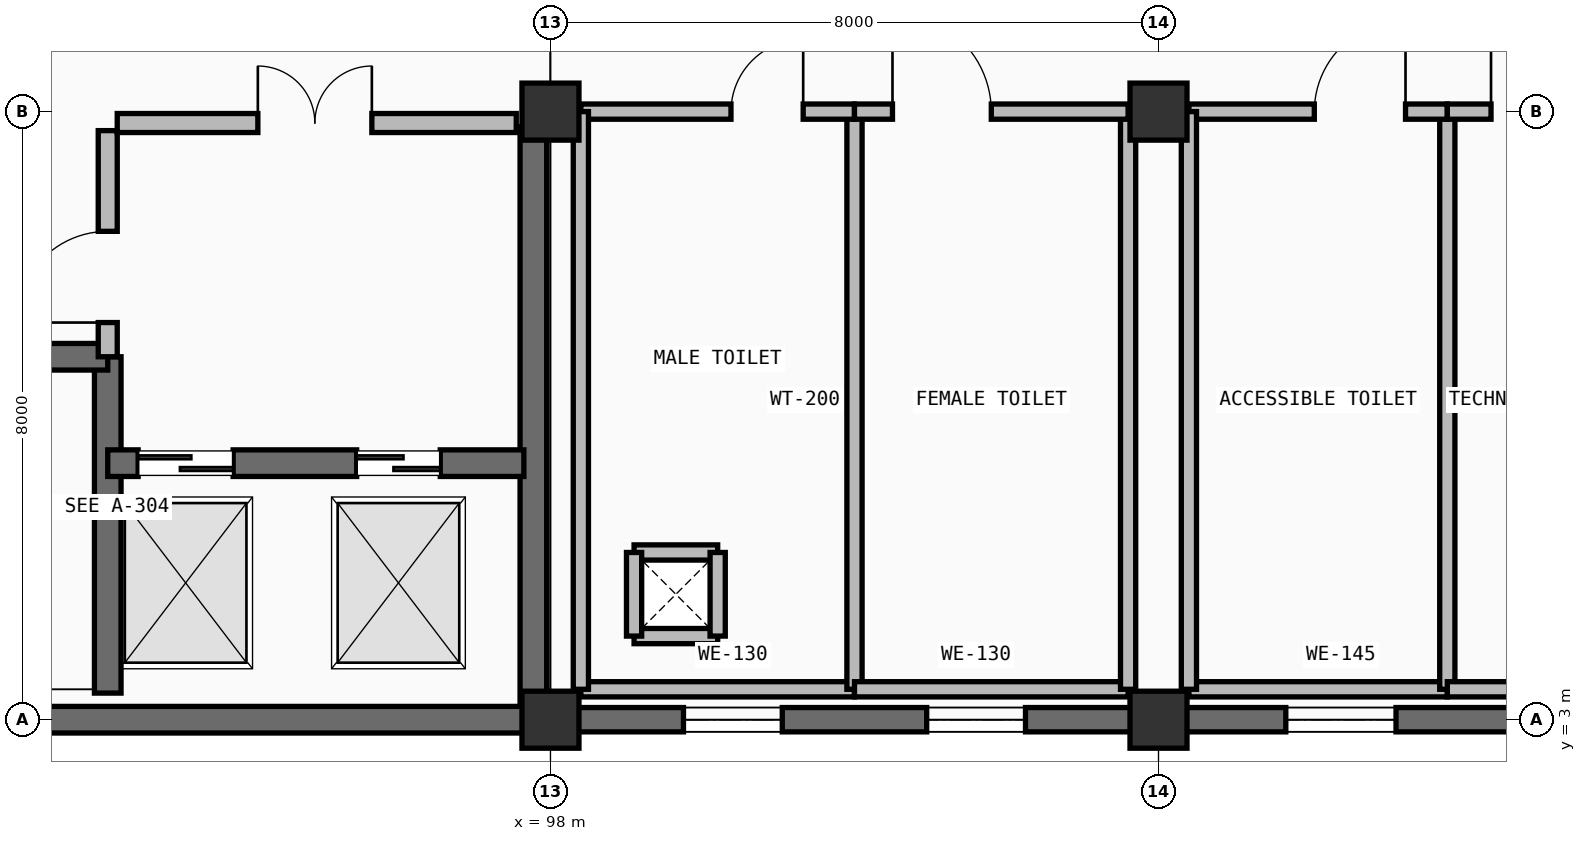
"""IFC4 building model, lengths in metres.
Left out: names, types, materials, properties, quantities, classifications, styles, units other than length and angle.
Written with IfcOpenShell. Run it as: python <this file> out.ifc"""

import sys

from ifc_helpers import new_model, si_unit, direction, frame, frame_2d, origin, origin_2d, place, context, subcontext, project, spatial, rectangle, extrude, element, fill, save


model = new_model("IFC4")
c1 = context("Model", 3, precision=1e-05, world=origin(), true_north=direction((0.0, 1.0)))
c2 = subcontext(c1, "Body", "Model", "MODEL_VIEW")
j1 = project(units=[si_unit("LENGTHUNIT", "METRE"), si_unit("PLANEANGLEUNIT", "RADIAN")], contexts=[c1])
p1 = place(None, origin())
s1 = spatial("IfcSite", under=j1, at=p1, CompositionType="ELEMENT")
p2 = place(p1, origin())
s2 = spatial("IfcBuilding", under=s1, at=p2, CompositionType="ELEMENT")
p3 = place(p2, frame((0.0, 0.0, 5.4)))
s3 = spatial("IfcBuildingStorey", under=s2, at=p3, CompositionType="ELEMENT", Elevation=5.4)
for number, where, z_axis, x_axis in (
    (1, (98.0, 3.0, 0.0), (0.0, 0.0, 1.0), (1.0, 0.0, 0.0)),
    (2, (98.0, 11.0, 0.0), (0.0, 0.0, 1.0), (1.0, 0.0, 0.0)),
    (3, (106.0, 3.0, 0.0), (0.0, 0.0, 1.0), (1.0, 0.0, 0.0)),
    (4, (106.0, 11.0, 0.0), (0.0, 0.0, 1.0), (1.0, 0.0, 0.0)),
):
    element("IfcColumn", number, at=place(p3, frame(where, z_axis=z_axis, x_axis=x_axis)), inside=s3, PredefinedType="COLUMN", context=c2, shape_type="SweptSolid", body=[
        extrude(rectangle(XDim=0.75, YDim=0.75, at=origin_2d()), origin(), (0.0, 0.0, 1.0), 4.5),
    ])
p4 = place(p3, frame((114.0, 3.0, 0.0), z_axis=(0.0, 0.0, 1.0), x_axis=(-1.0, 0.0, 0.0)))
e5 = element("IfcWall", 5, at=p4, inside=s3, PredefinedType="SOLIDWALL", context=c2, shape_type="SweptSolid", body=[
    extrude(rectangle(XDim=8.0, YDim=0.32, at=frame_2d((4.0, 0.0))), origin(), (0.0, 0.0, 1.0), 4.5),
])
p5 = place(p4, frame((1.675, 0.0, 1.0)))
e6 = element("IfcOpeningElement", 6, at=p5, cuts=e5, PredefinedType="OPENING", context=c2, shape_type="SweptSolid", body=[
    extrude(rectangle(XDim=1.45, YDim=1.85, at=frame_2d((0.725, 0.925))), frame((0.0, 0.17, 0.0), z_axis=(0.0, -1.0, 0.0), x_axis=(1.0, 0.0, 0.0)), (0.0, 0.0, 1.0), 0.34),
])
p6 = place(p4, frame((4.875, 0.0, 1.0)))
e7 = element("IfcOpeningElement", 7, at=p6, cuts=e5, PredefinedType="OPENING", context=c2, shape_type="SweptSolid", body=[
    extrude(rectangle(XDim=1.45, YDim=1.85, at=frame_2d((0.725, 0.925))), frame((0.0, 0.17, 0.0), z_axis=(0.0, -1.0, 0.0), x_axis=(1.0, 0.0, 0.0)), (0.0, 0.0, 1.0), 0.34),
])
p7 = place(p3, frame((106.0, 3.0, 0.0), z_axis=(0.0, 0.0, 1.0), x_axis=(-1.0, 0.0, 0.0)))
e8 = element("IfcWall", 8, at=p7, inside=s3, PredefinedType="SOLIDWALL", context=c2, shape_type="SweptSolid", body=[
    extrude(rectangle(XDim=8.0, YDim=0.32, at=frame_2d((4.0, 0.0))), origin(), (0.0, 0.0, 1.0), 4.5),
])
p8 = place(p7, frame((1.75, 0.0, 1.0)))
e9 = element("IfcOpeningElement", 9, at=p8, cuts=e8, PredefinedType="OPENING", context=c2, shape_type="SweptSolid", body=[
    extrude(rectangle(XDim=1.3, YDim=1.7, at=frame_2d((0.65, 0.85))), frame((0.0, 0.17, 0.0), z_axis=(0.0, -1.0, 0.0), x_axis=(1.0, 0.0, 0.0)), (0.0, 0.0, 1.0), 0.34),
])
p9 = place(p7, frame((4.95, 0.0, 1.0)))
e10 = element("IfcOpeningElement", 10, at=p9, cuts=e8, PredefinedType="OPENING", context=c2, shape_type="SweptSolid", body=[
    extrude(rectangle(XDim=1.3, YDim=1.7, at=frame_2d((0.65, 0.85))), frame((0.0, 0.17, 0.0), z_axis=(0.0, -1.0, 0.0), x_axis=(1.0, 0.0, 0.0)), (0.0, 0.0, 1.0), 0.34),
])
p10 = place(p3, frame((98.0, 3.0, 0.0), z_axis=(0.0, 0.0, 1.0), x_axis=(-1.0, 0.0, 0.0)))
e11 = element("IfcWall", 11, at=p10, inside=s3, PredefinedType="SHEAR", context=c2, shape_type="SweptSolid", body=[
    extrude(rectangle(XDim=8.0, YDim=0.35, at=frame_2d((4.0, 0.0))), origin(), (0.0, 0.0, 1.0), 4.5),
])
p11 = place(p3, frame((92.175, 3.35, 0.0), z_axis=(0.0, 0.0, 1.0), x_axis=(0.0, 1.0, 0.0)))
e12 = element("IfcWall", 12, at=p11, inside=s3, PredefinedType="SHEAR", context=c2, shape_type="SweptSolid", body=[
    extrude(rectangle(XDim=4.425, YDim=0.35, at=frame_2d((2.212, 0.0))), origin(), (0.0, 0.0, 1.0), 4.2),
])
p12 = place(p3, frame((97.775, 3.2, 0.0), z_axis=(0.0, 0.0, 1.0), x_axis=(0.0, 1.0, 0.0)))
e13 = element("IfcWall", 13, at=p12, inside=s3, PredefinedType="SHEAR", context=c2, shape_type="SweptSolid", body=[
    extrude(rectangle(XDim=7.6, YDim=0.35, at=frame_2d((3.8, 0.0))), origin(), (0.0, 0.0, 1.0), 4.2),
])
p13 = place(p3, frame((82.35, 7.775, 0.0), z_axis=(0.0, 0.0, 1.0), x_axis=(1.0, 0.0, 0.0)))
e14 = element("IfcWall", 14, at=p13, inside=s3, PredefinedType="SHEAR", context=c2, shape_type="SweptSolid", body=[
    extrude(rectangle(XDim=9.825, YDim=0.35, at=frame_2d((4.913, 0.0))), origin(), (0.0, 0.0, 1.0), 4.2),
])
p14 = place(p13, frame((0.4, 0.0, 0.0)))
e15 = element("IfcOpeningElement", 15, at=p14, cuts=e14, PredefinedType="OPENING", context=c2, shape_type="SweptSolid", body=[
    extrude(rectangle(XDim=1.85, YDim=2.25, at=frame_2d((0.925, 1.125))), frame((0.0, 0.185, 0.0), z_axis=(0.0, -1.0, 0.0), x_axis=(1.0, 0.0, 0.0)), (0.0, 0.0, 1.0), 0.37),
])
p15 = place(p3, frame((92.175, 6.375, 0.0), z_axis=(0.0, 0.0, 1.0), x_axis=(1.0, 0.0, 0.0)))
e16 = element("IfcWall", 16, at=p15, inside=s3, PredefinedType="SHEAR", context=c2, shape_type="SweptSolid", body=[
    extrude(rectangle(XDim=5.475, YDim=0.35, at=frame_2d((2.737, 0.0))), origin(), (0.0, 0.0, 1.0), 4.2),
])
p16 = place(p15, frame((0.4, 0.0, 0.0)))
e17 = element("IfcOpeningElement", 17, at=p16, cuts=e16, PredefinedType="OPENING", context=c2, shape_type="SweptSolid", body=[
    extrude(rectangle(XDim=1.25, YDim=2.25, at=frame_2d((0.625, 1.125))), frame((0.0, 0.185, 0.0), z_axis=(0.0, -1.0, 0.0), x_axis=(1.0, 0.0, 0.0)), (0.0, 0.0, 1.0), 0.37),
])
p17 = place(p15, frame((3.275, 0.0, 0.0)))
e18 = element("IfcOpeningElement", 18, at=p17, cuts=e16, PredefinedType="OPENING", context=c2, shape_type="SweptSolid", body=[
    extrude(rectangle(XDim=1.1, YDim=2.2, at=frame_2d((0.55, 1.1))), frame((0.0, 0.185, 0.0), z_axis=(0.0, -1.0, 0.0), x_axis=(1.0, 0.0, 0.0)), (0.0, 0.0, 1.0), 0.37),
])
p18 = place(p3, frame((92.175, 7.775, 0.0), z_axis=(0.0, 0.0, 1.0), x_axis=(0.0, 1.0, 0.0)))
e19 = element("IfcWall", 19, at=p18, inside=s3, PredefinedType="PARTITIONING", context=c2, shape_type="SweptSolid", body=[
    extrude(rectangle(XDim=2.975, YDim=0.25, at=frame_2d((1.488, 0.0))), origin(), (0.0, 0.0, 1.0), 4.2),
])
p19 = place(p18, frame((0.45, 0.0, 0.0)))
e20 = element("IfcOpeningElement", 20, at=p19, cuts=e19, PredefinedType="OPENING", context=c2, shape_type="SweptSolid", body=[
    extrude(rectangle(XDim=1.2, YDim=2.2, at=frame_2d((0.6, 1.1))), frame((0.0, 0.135, 0.0), z_axis=(0.0, -1.0, 0.0), x_axis=(1.0, 0.0, 0.0)), (0.0, 0.0, 1.0), 0.27),
])
p20 = place(p3, frame((92.3, 10.85, 0.0), z_axis=(0.0, 0.0, 1.0), x_axis=(1.0, 0.0, 0.0)))
e21 = element("IfcWall", 21, at=p20, inside=s3, PredefinedType="PARTITIONING", context=c2, shape_type="SweptSolid", body=[
    extrude(rectangle(XDim=5.25, YDim=0.25, at=frame_2d((2.625, 0.0))), origin(), (0.0, 0.0, 1.0), 3.435),
])
p21 = place(p20, frame((1.85, 0.0, 0.0)))
e22 = element("IfcOpeningElement", 22, at=p21, cuts=e21, PredefinedType="OPENING", context=c2, shape_type="SweptSolid", body=[
    extrude(rectangle(XDim=1.5, YDim=2.2, at=frame_2d((0.75, 1.1))), frame((0.0, 0.135, 0.0), z_axis=(0.0, -1.0, 0.0), x_axis=(1.0, 0.0, 0.0)), (0.0, 0.0, 1.0), 0.27),
])
p22 = place(p3, frame((98.4, 3.4, 0.0), z_axis=(0.0, 0.0, 1.0), x_axis=(1.0, 0.0, 0.0)))
e23 = element("IfcWall", 23, at=p22, inside=s3, PredefinedType="PARTITIONING", context=c2, shape_type="SweptSolid", body=[
    extrude(rectangle(XDim=3.6, YDim=0.2, at=frame_2d((1.8, 0.0))), origin(), (0.0, 0.0, 1.0), 3.505),
])
p23 = place(p3, frame((102.0, 3.4, 0.0), z_axis=(0.0, 0.0, 1.0), x_axis=(0.0, 1.0, 0.0)))
e24 = element("IfcWall", 24, at=p23, inside=s3, PredefinedType="PARTITIONING", context=c2, shape_type="SweptSolid", body=[
    extrude(rectangle(XDim=7.6, YDim=0.2, at=frame_2d((3.8, 0.0))), origin(), (0.0, 0.0, 1.0), 3.635),
])
p24 = place(p3, frame((98.4, 11.0, 0.0), z_axis=(0.0, 0.0, 1.0), x_axis=(1.0, 0.0, 0.0)))
e25 = element("IfcWall", 25, at=p24, inside=s3, PredefinedType="PARTITIONING", context=c2, shape_type="SweptSolid", body=[
    extrude(rectangle(XDim=3.6, YDim=0.2, at=frame_2d((1.8, 0.0))), origin(), (0.0, 0.0, 1.0), 3.435),
])
p25 = place(p24, frame((1.975, 0.0, 0.0)))
e26 = element("IfcOpeningElement", 26, at=p25, cuts=e25, PredefinedType="OPENING", context=c2, shape_type="SweptSolid", body=[
    extrude(rectangle(XDim=0.95, YDim=2.1, at=frame_2d((0.475, 1.05))), frame((0.0, 0.11, 0.0), z_axis=(0.0, -1.0, 0.0), x_axis=(1.0, 0.0, 0.0)), (0.0, 0.0, 1.0), 0.22),
])
p26 = place(p3, frame((98.4, 3.4, 0.0), z_axis=(0.0, 0.0, 1.0), x_axis=(0.0, 1.0, 0.0)))
e27 = element("IfcWall", 27, at=p26, inside=s3, PredefinedType="PARTITIONING", context=c2, shape_type="SweptSolid", body=[
    extrude(rectangle(XDim=7.6, YDim=0.2, at=frame_2d((3.8, 0.0))), origin(), (0.0, 0.0, 1.0), 3.485),
])
p27 = place(p3, frame((102.0, 3.4, 0.0), z_axis=(0.0, 0.0, 1.0), x_axis=(1.0, 0.0, 0.0)))
e28 = element("IfcWall", 28, at=p27, inside=s3, PredefinedType="PARTITIONING", context=c2, shape_type="SweptSolid", body=[
    extrude(rectangle(XDim=3.6, YDim=0.2, at=frame_2d((1.8, 0.0))), origin(), (0.0, 0.0, 1.0), 3.505),
])
p28 = place(p3, frame((105.6, 3.4, 0.0), z_axis=(0.0, 0.0, 1.0), x_axis=(0.0, 1.0, 0.0)))
e29 = element("IfcWall", 29, at=p28, inside=s3, PredefinedType="PARTITIONING", context=c2, shape_type="SweptSolid", body=[
    extrude(rectangle(XDim=7.6, YDim=0.2, at=frame_2d((3.8, 0.0))), origin(), (0.0, 0.0, 1.0), 3.485),
])
p29 = place(p3, frame((102.0, 11.0, 0.0), z_axis=(0.0, 0.0, 1.0), x_axis=(1.0, 0.0, 0.0)))
e30 = element("IfcWall", 30, at=p29, inside=s3, PredefinedType="PARTITIONING", context=c2, shape_type="SweptSolid", body=[
    extrude(rectangle(XDim=3.6, YDim=0.2, at=frame_2d((1.8, 0.0))), origin(), (0.0, 0.0, 1.0), 3.435),
])
p30 = place(p29, frame((0.5, 0.0, 0.0)))
e31 = element("IfcOpeningElement", 31, at=p30, cuts=e30, PredefinedType="OPENING", context=c2, shape_type="SweptSolid", body=[
    extrude(rectangle(XDim=1.3, YDim=2.2, at=frame_2d((0.65, 1.1))), frame((0.0, 0.11, 0.0), z_axis=(0.0, -1.0, 0.0), x_axis=(1.0, 0.0, 0.0)), (0.0, 0.0, 1.0), 0.22),
])
p31 = place(p3, frame((106.4, 3.4, 0.0), z_axis=(0.0, 0.0, 1.0), x_axis=(1.0, 0.0, 0.0)))
e32 = element("IfcWall", 32, at=p31, inside=s3, PredefinedType="PARTITIONING", context=c2, shape_type="SweptSolid", body=[
    extrude(rectangle(XDim=3.4, YDim=0.2, at=frame_2d((1.7, 0.0))), origin(), (0.0, 0.0, 1.0), 3.505),
])
p32 = place(p3, frame((109.8, 3.4, 0.0), z_axis=(0.0, 0.0, 1.0), x_axis=(0.0, 1.0, 0.0)))
e33 = element("IfcWall", 33, at=p32, inside=s3, PredefinedType="PARTITIONING", context=c2, shape_type="SweptSolid", body=[
    extrude(rectangle(XDim=7.6, YDim=0.2, at=frame_2d((3.8, 0.0))), origin(), (0.0, 0.0, 1.0), 3.635),
])
p33 = place(p3, frame((106.4, 11.0, 0.0), z_axis=(0.0, 0.0, 1.0), x_axis=(1.0, 0.0, 0.0)))
e34 = element("IfcWall", 34, at=p33, inside=s3, PredefinedType="PARTITIONING", context=c2, shape_type="SweptSolid", body=[
    extrude(rectangle(XDim=3.4, YDim=0.2, at=frame_2d((1.7, 0.0))), origin(), (0.0, 0.0, 1.0), 3.435),
])
p34 = place(p33, frame((1.65, 0.0, 0.0)))
e35 = element("IfcOpeningElement", 35, at=p34, cuts=e34, PredefinedType="OPENING", context=c2, shape_type="SweptSolid", body=[
    extrude(rectangle(XDim=1.2, YDim=2.2, at=frame_2d((0.6, 1.1))), frame((0.0, 0.11, 0.0), z_axis=(0.0, -1.0, 0.0), x_axis=(1.0, 0.0, 0.0)), (0.0, 0.0, 1.0), 0.22),
])
p35 = place(p3, frame((106.4, 3.4, 0.0), z_axis=(0.0, 0.0, 1.0), x_axis=(0.0, 1.0, 0.0)))
e36 = element("IfcWall", 36, at=p35, inside=s3, PredefinedType="PARTITIONING", context=c2, shape_type="SweptSolid", body=[
    extrude(rectangle(XDim=7.6, YDim=0.2, at=frame_2d((3.8, 0.0))), origin(), (0.0, 0.0, 1.0), 3.485),
])
p36 = place(p3, frame((109.8, 3.4, 0.0), z_axis=(0.0, 0.0, 1.0), x_axis=(1.0, 0.0, 0.0)))
e37 = element("IfcWall", 37, at=p36, inside=s3, PredefinedType="PARTITIONING", context=c2, shape_type="SweptSolid", body=[
    extrude(rectangle(XDim=3.4, YDim=0.2, at=frame_2d((1.7, 0.0))), origin(), (0.0, 0.0, 1.0), 3.505),
])
p37 = place(p3, frame((109.8, 11.0, 0.0), z_axis=(0.0, 0.0, 1.0), x_axis=(1.0, 0.0, 0.0)))
e38 = element("IfcWall", 38, at=p37, inside=s3, PredefinedType="PARTITIONING", context=c2, shape_type="SweptSolid", body=[
    extrude(rectangle(XDim=3.4, YDim=0.2, at=frame_2d((1.7, 0.0))), origin(), (0.0, 0.0, 1.0), 3.435),
])
p38 = place(p37, frame((0.575, 0.0, 0.0)))
e39 = element("IfcOpeningElement", 39, at=p38, cuts=e38, PredefinedType="OPENING", context=c2, shape_type="SweptSolid", body=[
    extrude(rectangle(XDim=1.15, YDim=2.18, at=frame_2d((0.575, 1.09))), frame((0.0, 0.11, 0.0), z_axis=(0.0, -1.0, 0.0), x_axis=(1.0, 0.0, 0.0)), (0.0, 0.0, 1.0), 0.22),
])
for number, where, z_axis, x_axis in (
    (40, (99.1, 4.1, 0.0), (0.0, 0.0, 1.0), (1.0, 0.0, 0.0)),
    (41, (99.1, 5.2, 0.0), (0.0, 0.0, 1.0), (1.0, 0.0, 0.0)),
    (42, (99.1, 4.1, 0.0), (0.0, 0.0, 1.0), (0.0, 1.0, 0.0)),
    (43, (100.2, 4.1, 0.0), (0.0, 0.0, 1.0), (0.0, 1.0, 0.0)),
):
    element("IfcWall", number, at=place(p3, frame(where, z_axis=z_axis, x_axis=x_axis)), inside=s3, PredefinedType="PARTITIONING", context=c2, shape_type="SweptSolid", body=[
        extrude(rectangle(XDim=1.1, YDim=0.2, at=frame_2d((0.55, 0.0))), origin(), (0.0, 0.0, 1.0), 4.2),
    ])
p39 = place(p6, origin())
e44 = element("IfcWindow", 44, at=p39, inside=s3, PartitioningType="SINGLE_PANEL", PredefinedType="WINDOW", context=c2, shape_type="SweptSolid", body=[
    extrude(rectangle(XDim=1.45, YDim=1.85, at=frame_2d((0.725, 0.925))), frame((0.0, 0.03, 0.0), z_axis=(0.0, -1.0, 0.0), x_axis=(1.0, 0.0, 0.0)), (0.0, 0.0, 1.0), 0.06),
])
fill(e7, e44)
p40 = place(p8, origin())
e45 = element("IfcWindow", 45, at=p40, inside=s3, PartitioningType="SINGLE_PANEL", PredefinedType="WINDOW", context=c2, shape_type="SweptSolid", body=[
    extrude(rectangle(XDim=1.3, YDim=1.7, at=frame_2d((0.65, 0.85))), frame((0.0, 0.03, 0.0), z_axis=(0.0, -1.0, 0.0), x_axis=(1.0, 0.0, 0.0)), (0.0, 0.0, 1.0), 0.06),
])
fill(e9, e45)
p41 = place(p9, origin())
e46 = element("IfcWindow", 46, at=p41, inside=s3, PartitioningType="SINGLE_PANEL", PredefinedType="WINDOW", context=c2, shape_type="SweptSolid", body=[
    extrude(rectangle(XDim=1.3, YDim=1.7, at=frame_2d((0.65, 0.85))), frame((0.0, 0.03, 0.0), z_axis=(0.0, -1.0, 0.0), x_axis=(1.0, 0.0, 0.0)), (0.0, 0.0, 1.0), 0.06),
])
fill(e10, e46)
p42 = place(p16, origin())
e47 = element("IfcDoor", 47, at=p42, inside=s3, OperationType="DOUBLE_DOOR_SLIDING", PredefinedType="DOOR", context=c2, shape_type="SweptSolid", body=[
    extrude(rectangle(XDim=1.25, YDim=2.25, at=frame_2d((0.625, 1.125))), frame((0.0, 0.025, 0.0), z_axis=(0.0, -1.0, 0.0), x_axis=(1.0, 0.0, 0.0)), (0.0, 0.0, 1.0), 0.05),
])
fill(e17, e47)
p43 = place(p17, origin())
e48 = element("IfcDoor", 48, at=p43, inside=s3, OperationType="DOUBLE_DOOR_SLIDING", PredefinedType="DOOR", context=c2, shape_type="SweptSolid", body=[
    extrude(rectangle(XDim=1.1, YDim=2.2, at=frame_2d((0.55, 1.1))), frame((0.0, 0.025, 0.0), z_axis=(0.0, -1.0, 0.0), x_axis=(1.0, 0.0, 0.0)), (0.0, 0.0, 1.0), 0.05),
])
fill(e18, e48)
p44 = place(p19, origin())
e49 = element("IfcDoor", 49, at=p44, inside=s3, OperationType="SINGLE_SWING_LEFT", PredefinedType="DOOR", context=c2, shape_type="SweptSolid", body=[
    extrude(rectangle(XDim=1.2, YDim=2.2, at=frame_2d((0.6, 1.1))), frame((0.0, 0.025, 0.0), z_axis=(0.0, -1.0, 0.0), x_axis=(1.0, 0.0, 0.0)), (0.0, 0.0, 1.0), 0.05),
])
fill(e20, e49)
p45 = place(p21, origin())
e50 = element("IfcDoor", 50, at=p45, inside=s3, OperationType="DOUBLE_DOOR_SINGLE_SWING", PredefinedType="DOOR", context=c2, shape_type="SweptSolid", body=[
    extrude(rectangle(XDim=1.5, YDim=2.2, at=frame_2d((0.75, 1.1))), frame((0.0, 0.025, 0.0), z_axis=(0.0, -1.0, 0.0), x_axis=(1.0, 0.0, 0.0)), (0.0, 0.0, 1.0), 0.05),
])
fill(e22, e50)
p46 = place(p25, origin())
e51 = element("IfcDoor", 51, at=p46, inside=s3, OperationType="SINGLE_SWING_RIGHT", PredefinedType="DOOR", context=c2, shape_type="SweptSolid", body=[
    extrude(rectangle(XDim=0.95, YDim=2.1, at=frame_2d((0.475, 1.05))), frame((0.0, 0.025, 0.0), z_axis=(0.0, -1.0, 0.0), x_axis=(1.0, 0.0, 0.0)), (0.0, 0.0, 1.0), 0.05),
])
fill(e26, e51)
p47 = place(p30, origin())
e52 = element("IfcDoor", 52, at=p47, inside=s3, OperationType="SINGLE_SWING_LEFT", PredefinedType="DOOR", context=c2, shape_type="SweptSolid", body=[
    extrude(rectangle(XDim=1.3, YDim=2.2, at=frame_2d((0.65, 1.1))), frame((0.0, 0.025, 0.0), z_axis=(0.0, -1.0, 0.0), x_axis=(1.0, 0.0, 0.0)), (0.0, 0.0, 1.0), 0.05),
])
fill(e31, e52)
p48 = place(p34, origin())
e53 = element("IfcDoor", 53, at=p48, inside=s3, OperationType="SINGLE_SWING_RIGHT", PredefinedType="DOOR", context=c2, shape_type="SweptSolid", body=[
    extrude(rectangle(XDim=1.2, YDim=2.2, at=frame_2d((0.6, 1.1))), frame((0.0, 0.025, 0.0), z_axis=(0.0, -1.0, 0.0), x_axis=(1.0, 0.0, 0.0)), (0.0, 0.0, 1.0), 0.05),
])
fill(e35, e53)
p49 = place(p38, origin())
e54 = element("IfcDoor", 54, at=p49, inside=s3, OperationType="SINGLE_SWING_LEFT", PredefinedType="DOOR", context=c2, shape_type="SweptSolid", body=[
    extrude(rectangle(XDim=1.15, YDim=2.18, at=frame_2d((0.575, 1.09))), frame((0.0, 0.025, 0.0), z_axis=(0.0, -1.0, 0.0), x_axis=(1.0, 0.0, 0.0)), (0.0, 0.0, 1.0), 0.05),
])
fill(e39, e54)
save(model, sys.argv[1])
